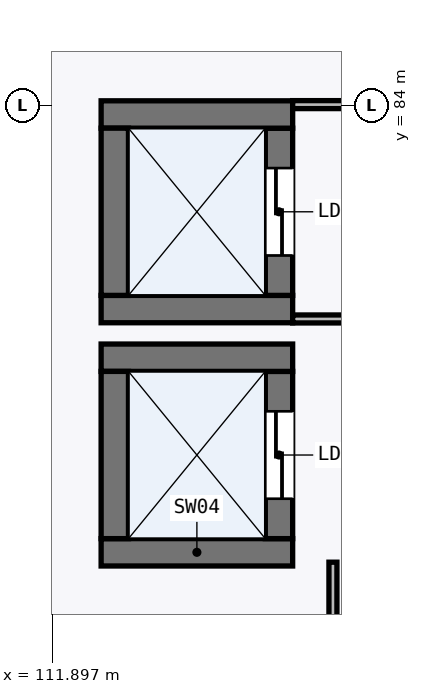
"""IFC4 building model, lengths in metres.
Left out: names, types, materials, properties, quantities, classifications, styles, units other than length and angle.
Written with IfcOpenShell. Run it as: python <this file> out.ifc"""

import sys

from ifc_helpers import new_model, si_unit, direction, frame, frame_2d, origin, place, context, subcontext, project, spatial, rectangle, extrude, element, fill, save


model = new_model("IFC4")
c1 = context("Model", 3, precision=1e-05, world=origin(), true_north=direction((0.0, 1.0)))
c2 = subcontext(c1, "Body", "Model", "MODEL_VIEW")
j1 = project(units=[si_unit("LENGTHUNIT", "METRE"), si_unit("PLANEANGLEUNIT", "RADIAN")], contexts=[c1])
p1 = place(None, origin())
s1 = spatial("IfcSite", under=j1, at=p1, CompositionType="ELEMENT")
p2 = place(p1, origin())
s2 = spatial("IfcBuilding", under=s1, at=p2, CompositionType="ELEMENT")
p3 = place(p2, frame((0.0, 0.0, 21.6)))
s3 = spatial("IfcBuildingStorey", under=s2, at=p3, CompositionType="ELEMENT", Elevation=21.6)
p4 = place(p3, frame((112.54, 78.12, 0.0), z_axis=(0.0, 0.0, 1.0), x_axis=(1.0, 0.0, 0.0)))
e1 = element("IfcWall", 1, at=p4, inside=s3, PredefinedType="SHEAR", context=c2, shape_type="SweptSolid", body=[
    extrude(rectangle(XDim=2.52, YDim=0.36, at=frame_2d((1.26, 0.0))), origin(), (0.0, 0.0, 1.0), 4.845),
])
p5 = place(p3, frame((114.88, 78.3, 0.0), z_axis=(0.0, 0.0, 1.0), x_axis=(0.0, 1.0, 0.0)))
e2 = element("IfcWall", 2, at=p5, inside=s3, PredefinedType="SHEAR", context=c2, shape_type="SweptSolid", body=[
    extrude(rectangle(XDim=2.2, YDim=0.36, at=frame_2d((1.1, 0.0))), origin(), (0.0, 0.0, 1.0), 4.845),
])
p6 = place(p5, frame((0.525, 0.0, 0.0)))
e3 = element("IfcOpeningElement", 3, at=p6, cuts=e2, PredefinedType="OPENING", context=c2, shape_type="SweptSolid", body=[
    extrude(rectangle(XDim=1.15, YDim=2.2, at=frame_2d((0.575, 1.1))), frame((0.0, 0.19, 0.0), z_axis=(0.0, -1.0, 0.0), x_axis=(1.0, 0.0, 0.0)), (0.0, 0.0, 1.0), 0.38),
])
p7 = place(p3, frame((115.06, 80.68, 0.0), z_axis=(0.0, 0.0, 1.0), x_axis=(-1.0, 0.0, 0.0)))
e4 = element("IfcWall", 4, at=p7, inside=s3, PredefinedType="SHEAR", context=c2, shape_type="SweptSolid", body=[
    extrude(rectangle(XDim=2.52, YDim=0.36, at=frame_2d((1.26, 0.0))), origin(), (0.0, 0.0, 1.0), 4.845),
])
p8 = place(p3, frame((112.72, 80.5, 0.0), z_axis=(0.0, 0.0, 1.0), x_axis=(0.0, -1.0, 0.0)))
e5 = element("IfcWall", 5, at=p8, inside=s3, PredefinedType="SHEAR", context=c2, shape_type="SweptSolid", body=[
    extrude(rectangle(XDim=2.2, YDim=0.36, at=frame_2d((1.1, 0.0))), origin(), (0.0, 0.0, 1.0), 4.845),
])
p9 = place(p3, frame((112.54, 81.32, 0.0), z_axis=(0.0, 0.0, 1.0), x_axis=(1.0, 0.0, 0.0)))
e6 = element("IfcWall", 6, at=p9, inside=s3, PredefinedType="SHEAR", context=c2, shape_type="SweptSolid", body=[
    extrude(rectangle(XDim=2.52, YDim=0.36, at=frame_2d((1.26, 0.0))), origin(), (0.0, 0.0, 1.0), 4.845),
])
p10 = place(p3, frame((114.88, 81.5, 0.0), z_axis=(0.0, 0.0, 1.0), x_axis=(0.0, 1.0, 0.0)))
e7 = element("IfcWall", 7, at=p10, inside=s3, PredefinedType="SHEAR", context=c2, shape_type="SweptSolid", body=[
    extrude(rectangle(XDim=2.2, YDim=0.36, at=frame_2d((1.1, 0.0))), origin(), (0.0, 0.0, 1.0), 4.845),
])
p11 = place(p10, frame((0.525, 0.0, 0.0)))
e8 = element("IfcOpeningElement", 8, at=p11, cuts=e7, PredefinedType="OPENING", context=c2, shape_type="SweptSolid", body=[
    extrude(rectangle(XDim=1.15, YDim=2.2, at=frame_2d((0.575, 1.1))), frame((0.0, 0.19, 0.0), z_axis=(0.0, -1.0, 0.0), x_axis=(1.0, 0.0, 0.0)), (0.0, 0.0, 1.0), 0.38),
])
p12 = place(p3, frame((115.06, 83.88, 0.0), z_axis=(0.0, 0.0, 1.0), x_axis=(-1.0, 0.0, 0.0)))
e9 = element("IfcWall", 9, at=p12, inside=s3, PredefinedType="SHEAR", context=c2, shape_type="SweptSolid", body=[
    extrude(rectangle(XDim=2.52, YDim=0.36, at=frame_2d((1.26, 0.0))), origin(), (0.0, 0.0, 1.0), 4.845),
])
p13 = place(p3, frame((112.72, 83.7, 0.0), z_axis=(0.0, 0.0, 1.0), x_axis=(0.0, -1.0, 0.0)))
e10 = element("IfcWall", 10, at=p13, inside=s3, PredefinedType="SHEAR", context=c2, shape_type="SweptSolid", body=[
    extrude(rectangle(XDim=2.2, YDim=0.36, at=frame_2d((1.1, 0.0))), origin(), (0.0, 0.0, 1.0), 4.845),
])
p14 = place(p3, frame((115.59, 76.1, 0.0), z_axis=(0.0, 0.0, 1.0), x_axis=(0.0, 1.0, 0.0)))
e11 = element("IfcWall", 11, at=p14, inside=s3, PredefinedType="PARTITIONING", context=c2, shape_type="SweptSolid", body=[
    extrude(rectangle(XDim=1.89, YDim=0.105, at=frame_2d((0.945, 0.0))), origin(), (0.0, 0.0, 1.0), 4.845),
])
p15 = place(p3, frame((115.99, 81.19, 0.0), z_axis=(0.0, 0.0, 1.0), x_axis=(-1.0, 0.0, 0.0)))
e12 = element("IfcWall", 12, at=p15, inside=s3, PredefinedType="PARTITIONING", context=c2, shape_type="SweptSolid", body=[
    extrude(rectangle(XDim=0.93, YDim=0.105, at=frame_2d((0.465, 0.0))), origin(), (0.0, 0.0, 1.0), 4.845),
])
p16 = place(p3, frame((115.06, 84.01, 0.0), z_axis=(0.0, 0.0, 1.0), x_axis=(1.0, 0.0, 0.0)))
e13 = element("IfcWall", 13, at=p16, inside=s3, PredefinedType="PARTITIONING", context=c2, shape_type="SweptSolid", body=[
    extrude(rectangle(XDim=0.93, YDim=0.105, at=frame_2d((0.465, 0.0))), origin(), (0.0, 0.0, 1.0), 4.231),
])
p17 = place(p6, frame((1.15, 0.0, 0.0), z_axis=(0.0, 0.0, 1.0), x_axis=(-1.0, 0.0, 0.0)))
e14 = element("IfcDoor", 14, at=p17, inside=s3, OperationType="DOUBLE_DOOR_SLIDING", PredefinedType="DOOR", context=c2, shape_type="SweptSolid", body=[
    extrude(rectangle(XDim=1.15, YDim=2.2, at=frame_2d((0.575, 1.1))), frame((0.0, 0.025, 0.0), z_axis=(0.0, -1.0, 0.0), x_axis=(1.0, 0.0, 0.0)), (0.0, 0.0, 1.0), 0.05),
])
fill(e3, e14)
p18 = place(p11, frame((1.15, 0.0, 0.0), z_axis=(0.0, 0.0, 1.0), x_axis=(-1.0, 0.0, 0.0)))
e15 = element("IfcDoor", 15, at=p18, inside=s3, OperationType="DOUBLE_DOOR_SLIDING", PredefinedType="DOOR", context=c2, shape_type="SweptSolid", body=[
    extrude(rectangle(XDim=1.15, YDim=2.2, at=frame_2d((0.575, 1.1))), frame((0.0, 0.025, 0.0), z_axis=(0.0, -1.0, 0.0), x_axis=(1.0, 0.0, 0.0)), (0.0, 0.0, 1.0), 0.05),
])
fill(e8, e15)
save(model, sys.argv[1])
